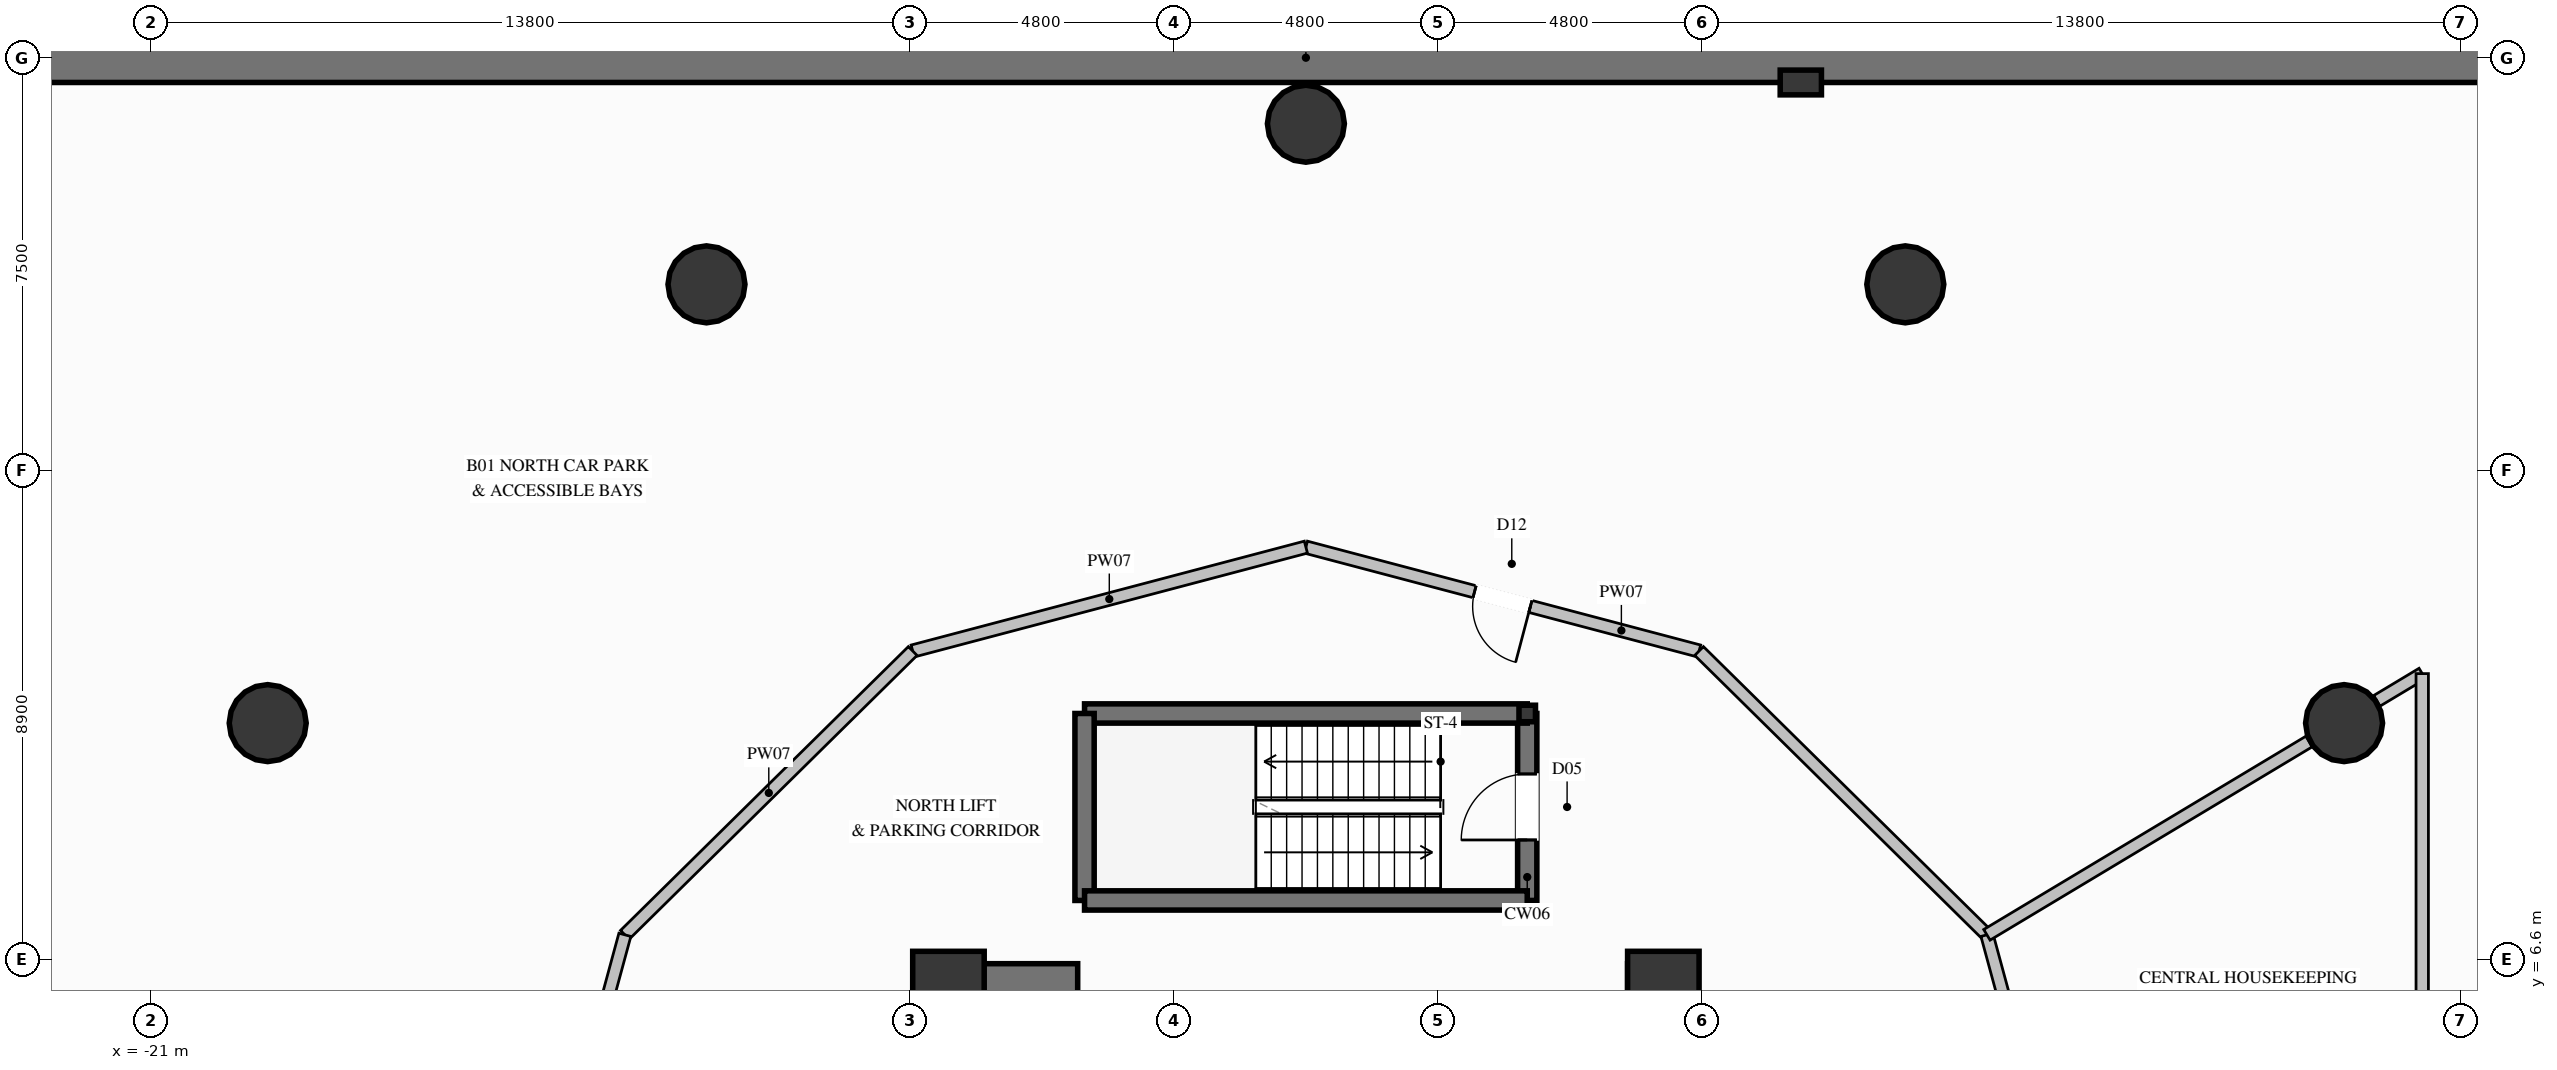
"""IFC4 building model, lengths in metres.
Left out: names, types, materials, properties, quantities, classifications, styles, units other than length and angle.
Written with IfcOpenShell. Run it as: python <this file> out.ifc"""

import sys

from ifc_helpers import new_model, si_unit, direction, frame, frame_2d, origin, origin_2d, place, context, subcontext, project, spatial, rectangle, hollow_rectangle, circle, extrude, element, fill, save


model = new_model("IFC4")
c1 = context("Model", 3, precision=1e-05, world=origin(), true_north=direction((0.0, 1.0)))
c2 = subcontext(c1, "Body", "Model", "MODEL_VIEW")
j1 = project(units=[si_unit("LENGTHUNIT", "METRE"), si_unit("PLANEANGLEUNIT", "RADIAN")], contexts=[c1])
p1 = place(None, origin())
s1 = spatial("IfcSite", under=j1, at=p1, CompositionType="ELEMENT")
p2 = place(p1, origin())
s2 = spatial("IfcBuilding", under=s1, at=p2, CompositionType="ELEMENT")
p3 = place(p2, frame((0.0, 0.0, -4.8)))
s3 = spatial("IfcBuildingStorey", under=s2, at=p3, CompositionType="ELEMENT", Elevation=-4.8)
p4 = place(p3, frame((31.45, 23.0, 0.0), z_axis=(0.0, 0.0, 1.0), x_axis=(-1.0, 0.0, 0.0)))
e1 = element("IfcWall", 1, at=p4, inside=s3, PredefinedType="SHEAR", context=c2, shape_type="SweptSolid", body=[
    extrude(rectangle(XDim=62.9, YDim=0.9, at=frame_2d((31.45, 0.0))), origin(), (0.0, 0.0, 1.0), 4.8),
])
p5 = place(p3, frame((9.0, 22.55, 0.0), z_axis=(0.0, 0.0, 1.0), x_axis=(0.0, 1.0, 0.0)))
e2 = element("IfcColumn", 2, at=p5, inside=s3, PredefinedType="PILASTER", context=c2, shape_type="SweptSolid", body=[
    extrude(rectangle(XDim=0.45, YDim=0.75, at=origin_2d()), origin(), (0.0, 0.0, 1.0), 4.8),
])
for number, where, z_axis, x_axis in (
    (3, (6.5, 6.1, 0.0), (0.0, 0.0, 1.0), (1.0, 0.0, 0.0)),
    (4, (-6.5, 6.1, 0.0), (0.0, 0.0, 1.0), (1.0, 0.0, 0.0)),
):
    element("IfcColumn", number, at=place(p3, frame(where, z_axis=z_axis, x_axis=x_axis)), inside=s3, PredefinedType="COLUMN", context=c2, shape_type="SweptSolid", body=[
        extrude(rectangle(XDim=1.3, YDim=1.3, at=origin_2d()), origin(), (0.0, 0.0, 1.0), 4.8),
    ])
p6 = place(p3, frame((-6.075, 6.1, 0.0), z_axis=(0.0, 0.0, 1.0), x_axis=(1.0, 0.0, 0.0)))
e5 = element("IfcWall", 5, at=p6, inside=s3, PredefinedType="SHEAR", context=c2, shape_type="SweptSolid", body=[
    extrude(rectangle(XDim=1.925, YDim=0.85, at=frame_2d((0.962, 0.0))), origin(), (0.0, 0.0, 1.0), 4.8),
])
p7 = place(p3, frame((5.85, 6.1, 0.0), z_axis=(0.0, 0.0, 1.0), x_axis=(1.0, 0.0, 0.0)))
e6 = element("IfcWall", 6, at=p7, inside=s3, PredefinedType="SHEAR", context=c2, shape_type="SweptSolid", body=[
    extrude(rectangle(XDim=0.225, YDim=0.85, at=frame_2d((0.112, 0.0))), origin(), (0.0, 0.0, 1.0), 4.8),
])
p8 = place(p3, frame((-6.5, 2.35, 0.0), z_axis=(0.0, 0.0, 1.0), x_axis=(0.0, 1.0, 0.0)))
e7 = element("IfcWall", 7, at=p8, inside=s3, PredefinedType="SHEAR", context=c2, shape_type="SweptSolid", body=[
    extrude(rectangle(XDim=4.175, YDim=0.85, at=frame_2d((2.087, 0.0))), origin(), (0.0, 0.0, 1.0), 4.8),
])
p9 = place(p3, frame((6.5, 3.35, 0.0), z_axis=(0.0, 0.0, 1.0), x_axis=(0.0, 1.0, 0.0)))
e8 = element("IfcWall", 8, at=p9, inside=s3, PredefinedType="SHEAR", context=c2, shape_type="SweptSolid", body=[
    extrude(rectangle(XDim=3.175, YDim=0.85, at=frame_2d((1.587, 0.0))), origin(), (0.0, 0.0, 1.0), 4.8),
])
for number, where, z_axis, x_axis in (
    (9, (18.879, 10.9, 0.0), (0.0, 0.0, 1.0), (1.0, 0.0, 0.0)),
    (10, (10.9, 18.879, 0.0), (0.0, 0.0, 1.0), (1.0, 0.0, 0.0)),
    (11, (0.0, 21.8, 0.0), (0.0, 0.0, 1.0), (1.0, 0.0, 0.0)),
    (12, (-10.9, 18.879, 0.0), (0.0, 0.0, 1.0), (1.0, 0.0, 0.0)),
    (13, (-18.879, 10.9, 0.0), (0.0, 0.0, 1.0), (1.0, 0.0, 0.0)),
):
    element("IfcColumn", number, at=place(p3, frame(where, z_axis=z_axis, x_axis=x_axis)), inside=s3, PredefinedType="COLUMN", context=c2, shape_type="SweptSolid", body=[
        extrude(circle(Radius=0.7, at=origin_2d()), origin(), (0.0, 0.0, 1.0), 4.8),
    ])
p10 = place(p3, frame((4.025, 11.075, 0.0), z_axis=(0.0, 0.0, 1.0), x_axis=(1.0, 0.0, 0.0)))
e14 = element("IfcColumn", 14, at=p10, inside=s3, PredefinedType="COLUMN", context=c2, shape_type="SweptSolid", body=[
    extrude(hollow_rectangle(XDim=0.3, YDim=0.3, WallThickness=0.016, at=origin_2d()), origin(), (0.0, 0.0, 1.0), 4.8),
])
p11 = place(p3, frame((4.025, 7.675, 0.0), z_axis=(0.0, 0.0, 1.0), x_axis=(0.0, 1.0, 0.0)))
e15 = element("IfcWall", 15, at=p11, inside=s3, PredefinedType="SOLIDWALL", context=c2, shape_type="SweptSolid", body=[
    extrude(rectangle(XDim=3.4, YDim=0.35, at=frame_2d((1.7, 0.0))), origin(), (0.0, 0.0, 1.0), 4.395),
])
p12 = place(p11, frame((1.1, 0.0, 0.0)))
e16 = element("IfcOpeningElement", 16, at=p12, cuts=e15, PredefinedType="OPENING", context=c2, shape_type="SweptSolid", body=[
    extrude(rectangle(XDim=1.2, YDim=2.2, at=frame_2d((0.6, 1.1))), frame((0.0, 0.185, 0.0), z_axis=(0.0, -1.0, 0.0), x_axis=(1.0, 0.0, 0.0)), (0.0, 0.0, 1.0), 0.37),
])
p13 = place(p3, frame((4.025, 11.075, 0.0), z_axis=(0.0, 0.0, 1.0), x_axis=(-1.0, 0.0, 0.0)))
e17 = element("IfcWall", 17, at=p13, inside=s3, PredefinedType="SOLIDWALL", context=c2, shape_type="SweptSolid", body=[
    extrude(rectangle(XDim=8.05, YDim=0.35, at=frame_2d((4.025, 0.0))), origin(), (0.0, 0.0, 1.0), 4.395),
])
p14 = place(p3, frame((-4.025, 11.075, 0.0), z_axis=(0.0, 0.0, 1.0), x_axis=(0.0, -1.0, 0.0)))
e18 = element("IfcWall", 18, at=p14, inside=s3, PredefinedType="SOLIDWALL", context=c2, shape_type="SweptSolid", body=[
    extrude(rectangle(XDim=3.4, YDim=0.35, at=frame_2d((1.7, 0.0))), origin(), (0.0, 0.0, 1.0), 4.395),
])
p15 = place(p3, frame((-4.025, 7.675, 0.0), z_axis=(0.0, 0.0, 1.0), x_axis=(1.0, 0.0, 0.0)))
e19 = element("IfcWall", 19, at=p15, inside=s3, PredefinedType="SOLIDWALL", context=c2, shape_type="SweptSolid", body=[
    extrude(rectangle(XDim=8.05, YDim=0.35, at=frame_2d((4.025, 0.0))), origin(), (0.0, 0.0, 1.0), 4.395),
])
p16 = place(p3, frame((7.15, 12.211, 0.0), z_axis=(0.0, 0.0, 1.0), x_axis=(-0.966820901533, 0.255455170937, 0.0)))
e20 = element("IfcWall", 20, at=p16, inside=s3, PredefinedType="PARTITIONING", context=c2, shape_type="SweptSolid", body=[
    extrude(rectangle(XDim=7.395, YDim=0.225, at=frame_2d((3.698, 0.0))), origin(), (0.0, 0.0, 1.0), 4.395),
])
p17 = place(p16, frame((3.173, 0.0, 0.0)))
e21 = element("IfcOpeningElement", 21, at=p17, cuts=e20, PredefinedType="OPENING", context=c2, shape_type="SweptSolid", body=[
    extrude(rectangle(XDim=1.05, YDim=2.15, at=frame_2d((0.525, 1.075))), frame((0.0, 0.123, 0.0), z_axis=(0.0, -1.0, 0.0), x_axis=(1.0, 0.0, 0.0)), (0.0, 0.0, 1.0), 0.245),
])
p18 = place(p3, frame((12.384, 7.05, 0.0), z_axis=(0.0, 0.0, 1.0), x_axis=(-0.712071304345, 0.702107155303, 0.0)))
e22 = element("IfcWall", 22, at=p18, inside=s3, PredefinedType="PARTITIONING", context=c2, shape_type="SweptSolid", body=[
    extrude(rectangle(XDim=7.351, YDim=0.225, at=frame_2d((3.675, 0.0))), origin(), (0.0, 0.0, 1.0), 4.395),
])
p19 = place(p3, frame((0.0, 14.1, 0.0), z_axis=(0.0, 0.0, 1.0), x_axis=(-0.966820901533, -0.255455170937, 0.0)))
e23 = element("IfcWall", 23, at=p19, inside=s3, PredefinedType="PARTITIONING", context=c2, shape_type="SweptSolid", body=[
    extrude(rectangle(XDim=7.395, YDim=0.225, at=frame_2d((3.698, 0.0))), origin(), (0.0, 0.0, 1.0), 4.395),
])
p20 = place(p3, frame((-7.15, 12.211, 0.0), z_axis=(0.0, 0.0, 1.0), x_axis=(-0.712071304345, -0.702107155303, 0.0)))
e24 = element("IfcWall", 24, at=p20, inside=s3, PredefinedType="PARTITIONING", context=c2, shape_type="SweptSolid", body=[
    extrude(rectangle(XDim=7.351, YDim=0.225, at=frame_2d((3.675, 0.0))), origin(), (0.0, 0.0, 1.0), 4.395),
])
p21 = place(p3, frame((-12.384, 7.05, 0.0), z_axis=(0.0, 0.0, 1.0), x_axis=(-0.262260528785, -0.964997106235, 0.0)))
e25 = element("IfcWall", 25, at=p21, inside=s3, PredefinedType="PARTITIONING", context=c2, shape_type="SweptSolid", body=[
    extrude(rectangle(XDim=7.306, YDim=0.225, at=frame_2d((3.653, 0.0))), origin(), (0.0, 0.0, 1.0), 4.395),
])
p22 = place(p21, frame((3.128, 0.0, 0.0)))
e26 = element("IfcOpeningElement", 26, at=p22, cuts=e25, PredefinedType="OPENING", context=c2, shape_type="SweptSolid", body=[
    extrude(rectangle(XDim=1.05, YDim=2.15, at=frame_2d((0.525, 1.075))), frame((0.0, 0.123, 0.0), z_axis=(0.0, -1.0, 0.0), x_axis=(1.0, 0.0, 0.0)), (0.0, 0.0, 1.0), 0.245),
])
p23 = place(p3, frame((14.3, 0.0, 0.0), z_axis=(0.0, 0.0, 1.0), x_axis=(-0.262260528785, 0.964997106235, 0.0)))
e27 = element("IfcWall", 27, at=p23, inside=s3, PredefinedType="PARTITIONING", context=c2, shape_type="SweptSolid", body=[
    extrude(rectangle(XDim=7.306, YDim=0.225, at=frame_2d((3.653, 0.0))), origin(), (0.0, 0.0, 1.0), 4.395),
])
p24 = place(p23, frame((3.128, 0.0, 0.0)))
e28 = element("IfcOpeningElement", 28, at=p24, cuts=e27, PredefinedType="OPENING", context=c2, shape_type="SweptSolid", body=[
    extrude(rectangle(XDim=1.05, YDim=2.15, at=frame_2d((0.525, 1.075))), frame((0.0, 0.123, 0.0), z_axis=(0.0, -1.0, 0.0), x_axis=(1.0, 0.0, 0.0)), (0.0, 0.0, 1.0), 0.245),
])
p25 = place(p3, frame((12.384, 7.05, 0.0), z_axis=(0.0, 0.0, 1.0), x_axis=(0.857483465664, 0.514511521846, 0.0)))
e29 = element("IfcWall", 29, at=p25, inside=s3, PredefinedType="PARTITIONING", context=c2, shape_type="SweptSolid", body=[
    extrude(rectangle(XDim=6.832, YDim=0.225, at=frame_2d((3.416, 0.0))), origin(), (0.0, 0.0, 1.0), 3.686),
])
p26 = place(p3, frame((19.475, 11.305, 0.0), z_axis=(0.0, 0.0, 1.0), x_axis=(0.857425748935, 0.51460770016, 0.0)))
e30 = element("IfcWall", 30, at=p26, inside=s3, PredefinedType="PARTITIONING", context=c2, shape_type="SweptSolid", body=[
    extrude(rectangle(XDim=0.962, YDim=0.225, at=frame_2d((0.481, 0.0))), origin(), (0.0, 0.0, 1.0), 3.63),
])
p27 = place(p3, frame((20.3, 11.8, 0.0), z_axis=(0.0, 0.0, 1.0), x_axis=(0.0, -1.0, 0.0)))
e31 = element("IfcWall", 31, at=p27, inside=s3, PredefinedType="PARTITIONING", context=c2, shape_type="SweptSolid", body=[
    extrude(rectangle(XDim=11.8, YDim=0.225, at=frame_2d((5.9, 0.0))), origin(), (0.0, 0.0, 1.0), 4.395),
])
p28 = place(p12, origin())
e32 = element("IfcDoor", 32, at=p28, inside=s3, OperationType="SINGLE_SWING_LEFT", PredefinedType="DOOR", context=c2, shape_type="SweptSolid", body=[
    extrude(rectangle(XDim=1.2, YDim=2.2, at=frame_2d((0.6, 1.1))), frame((0.0, 0.025, 0.0), z_axis=(0.0, -1.0, 0.0), x_axis=(1.0, 0.0, 0.0)), (0.0, 0.0, 1.0), 0.05),
])
fill(e16, e32)
p29 = place(p17, origin())
e33 = element("IfcDoor", 33, at=p29, inside=s3, OperationType="SINGLE_SWING_LEFT", PredefinedType="DOOR", context=c2, shape_type="SweptSolid", body=[
    extrude(rectangle(XDim=1.05, YDim=2.15, at=frame_2d((0.525, 1.075))), frame((0.0, 0.025, 0.0), z_axis=(0.0, -1.0, 0.0), x_axis=(1.0, 0.0, 0.0)), (0.0, 0.0, 1.0), 0.05),
])
fill(e21, e33)
save(model, sys.argv[1])
